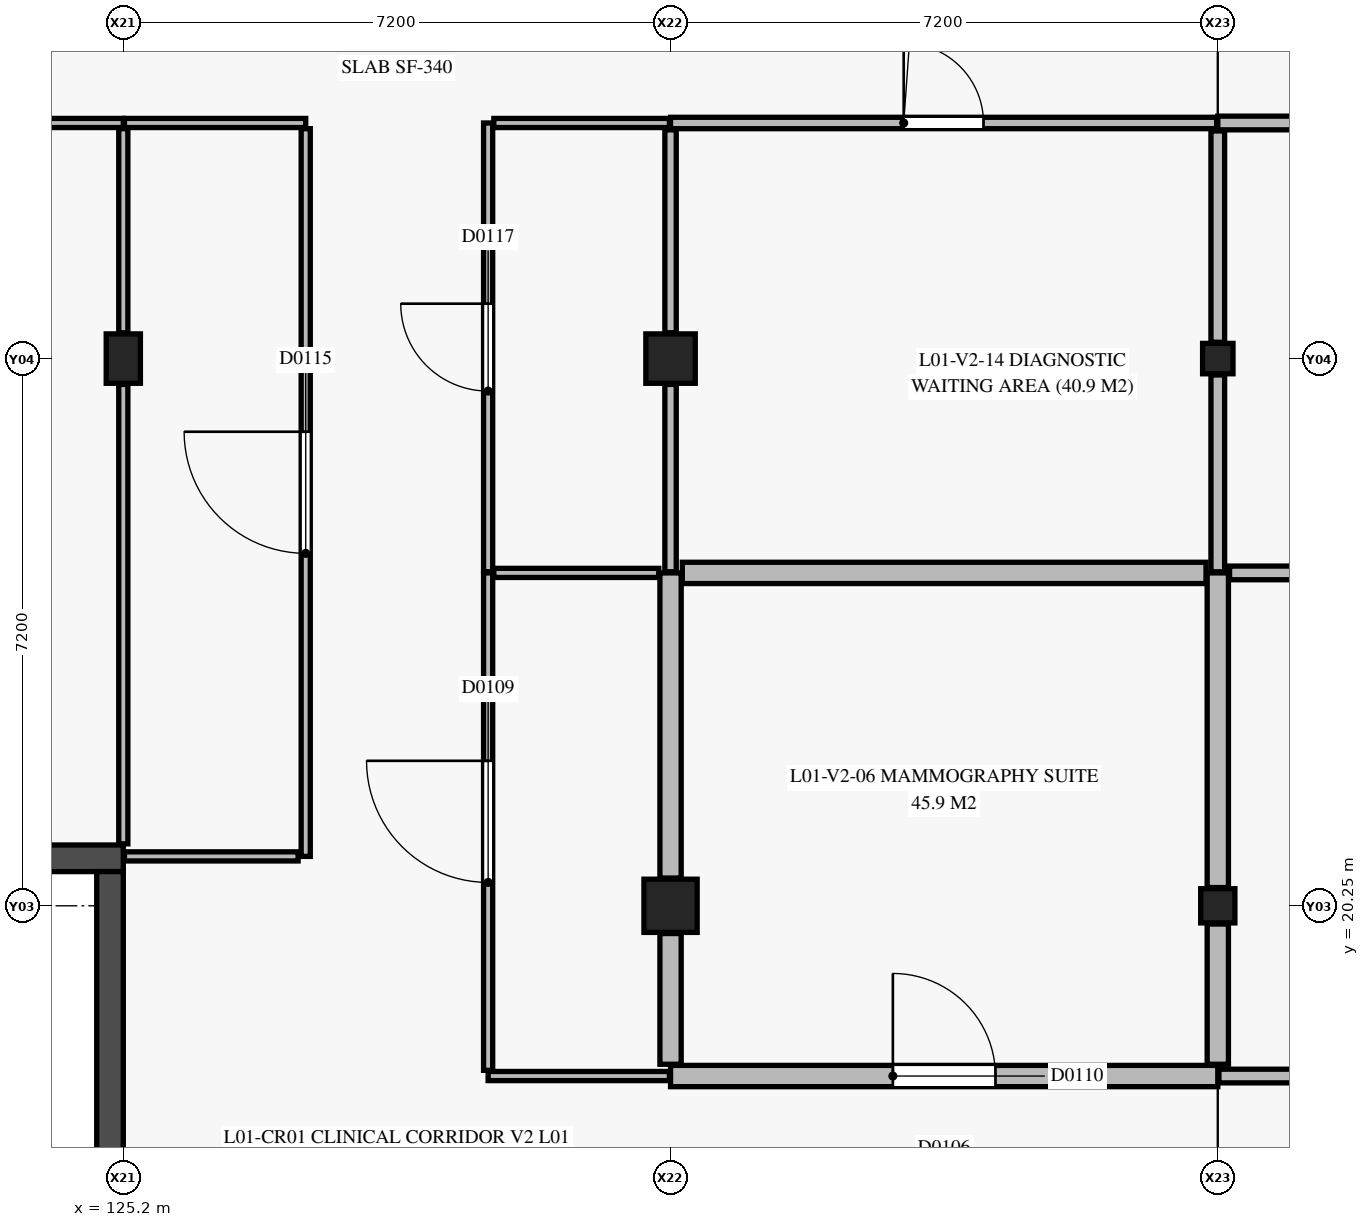
"""IFC4 building model, lengths in metres.
Left out: names, types, materials, properties, quantities, classifications, styles, units other than length and angle.
Written with IfcOpenShell. Run it as: python <this file> out.ifc"""

import sys

from ifc_helpers import new_model, si_unit, direction, frame, frame_2d, origin, origin_2d, place, context, subcontext, project, spatial, rectangle, extrude, element, fill, save


model = new_model("IFC4")
c1 = context("Model", 3, precision=1e-05, world=origin(), true_north=direction((0.0, 1.0)))
c2 = subcontext(c1, "Body", "Model", "MODEL_VIEW")
j1 = project(units=[si_unit("LENGTHUNIT", "METRE"), si_unit("PLANEANGLEUNIT", "RADIAN")], contexts=[c1])
p1 = place(None, origin())
s1 = spatial("IfcSite", under=j1, at=p1, CompositionType="ELEMENT")
p2 = place(p1, origin())
s2 = spatial("IfcBuilding", under=s1, at=p2, CompositionType="ELEMENT")
p3 = place(p2, frame((0.0, 0.0, 4.8)))
s3 = spatial("IfcBuildingStorey", under=s2, at=p3, CompositionType="ELEMENT", Elevation=4.8)
p4 = place(p3, frame((125.2, 27.45, 0.0), z_axis=(0.0, 0.0, 1.0), x_axis=(1.0, 0.0, 0.0)))
e1 = element("IfcColumn", 1, at=p4, inside=s3, PredefinedType="COLUMN", context=c2, shape_type="SweptSolid", body=[
    extrude(rectangle(XDim=0.45, YDim=0.65, at=origin_2d()), origin(), (0.0, 0.0, 1.0), 4.05),
])
p5 = place(p3, frame((132.4, 20.25, 0.0), z_axis=(0.0, 0.0, 1.0), x_axis=(1.0, 0.0, 0.0)))
e2 = element("IfcColumn", 2, at=p5, inside=s3, PredefinedType="COLUMN", context=c2, shape_type="SweptSolid", body=[
    extrude(rectangle(XDim=0.7, YDim=0.7, at=origin_2d()), origin(), (0.0, 0.0, 1.0), 4.05),
])
p6 = place(p3, frame((132.4, 27.45, 0.0), z_axis=(0.0, 0.0, 1.0), x_axis=(1.0, 0.0, 0.0)))
e3 = element("IfcColumn", 3, at=p6, inside=s3, PredefinedType="COLUMN", context=c2, shape_type="SweptSolid", body=[
    extrude(rectangle(XDim=0.65, YDim=0.65, at=origin_2d()), origin(), (0.0, 0.0, 1.0), 4.05),
])
p7 = place(p3, frame((139.6, 20.25, 0.0), z_axis=(0.0, 0.0, 1.0), x_axis=(1.0, 0.0, 0.0)))
e4 = element("IfcColumn", 4, at=p7, inside=s3, PredefinedType="COLUMN", context=c2, shape_type="SweptSolid", body=[
    extrude(rectangle(XDim=0.45, YDim=0.45, at=origin_2d()), origin(), (0.0, 0.0, 1.0), 4.05),
])
p8 = place(p3, frame((139.6, 27.45, 0.0), z_axis=(0.0, 0.0, 1.0), x_axis=(1.0, 0.0, 0.0)))
e5 = element("IfcColumn", 5, at=p8, inside=s3, PredefinedType="COLUMN", context=c2, shape_type="SweptSolid", body=[
    extrude(rectangle(XDim=0.4, YDim=0.4, at=origin_2d()), origin(), (0.0, 0.0, 1.0), 4.05),
])
p9 = place(p3, frame((121.2, 20.875, 0.0), z_axis=(0.0, 0.0, 1.0), x_axis=(1.0, 0.0, 0.0)))
e6 = element("IfcWall", 6, at=p9, inside=s3, PredefinedType="SHEAR", context=c2, shape_type="SweptSolid", body=[
    extrude(rectangle(XDim=4.0, YDim=0.35, at=frame_2d((2.0, 0.0))), origin(), (0.0, 0.0, 1.0), 4.2),
])
p10 = place(p3, frame((125.025, 13.4, 0.0), z_axis=(0.0, 0.0, 1.0), x_axis=(0.0, 1.0, 0.0)))
e7 = element("IfcWall", 7, at=p10, inside=s3, PredefinedType="SHEAR", context=c2, shape_type="SweptSolid", body=[
    extrude(rectangle(XDim=7.3, YDim=0.35, at=frame_2d((3.65, 0.0))), origin(), (0.0, 0.0, 1.0), 4.2),
])
p11 = place(p10, frame((0.12, 0.0, 0.0)))
e8 = element("IfcOpeningElement", 8, at=p11, cuts=e7, PredefinedType="OPENING", context=c2, shape_type="SweptSolid", body=[
    extrude(rectangle(XDim=1.5, YDim=2.15, at=frame_2d((0.75, 1.075))), frame((0.0, 0.185, 0.0), z_axis=(0.0, -1.0, 0.0), x_axis=(1.0, 0.0, 0.0)), (0.0, 0.0, 1.0), 0.37),
])
p12 = place(p3, frame((132.4, 18.01, 0.0), z_axis=(0.0, 0.0, 1.0), x_axis=(1.0, 0.0, 0.0)))
e9 = element("IfcWall", 9, at=p12, inside=s3, PredefinedType="PARTITIONING", context=c2, shape_type="SweptSolid", body=[
    extrude(rectangle(XDim=7.2, YDim=0.28, at=frame_2d((3.6, 0.0))), origin(), (0.0, 0.0, 1.0), 3.95),
])
p13 = place(p12, frame((2.925, 0.0, 0.0)))
e10 = element("IfcOpeningElement", 10, at=p13, cuts=e9, PredefinedType="OPENING", context=c2, shape_type="SweptSolid", body=[
    extrude(rectangle(XDim=1.35, YDim=2.2, at=frame_2d((0.675, 1.1))), frame((0.0, 0.15, 0.0), z_axis=(0.0, -1.0, 0.0), x_axis=(1.0, 0.0, 0.0)), (0.0, 0.0, 1.0), 0.3),
])
p14 = place(p3, frame((139.615, 18.01, 0.0), z_axis=(0.0, 0.0, 1.0), x_axis=(1.0, 0.0, 0.0)))
e11 = element("IfcWall", 11, at=p14, inside=s3, PredefinedType="PLUMBINGWALL", context=c2, shape_type="SweptSolid", body=[
    extrude(rectangle(XDim=3.435, YDim=0.18, at=frame_2d((1.718, 0.0))), origin(), (0.0, 0.0, 1.0), 3.95),
])
p15 = place(p14, frame((1.242, 0.0, 0.0)))
e12 = element("IfcOpeningElement", 12, at=p15, cuts=e11, PredefinedType="OPENING", context=c2, shape_type="SweptSolid", body=[
    extrude(rectangle(XDim=0.95, YDim=2.1, at=frame_2d((0.475, 1.05))), frame((0.0, 0.1, 0.0), z_axis=(0.0, -1.0, 0.0), x_axis=(1.0, 0.0, 0.0)), (0.0, 0.0, 1.0), 0.2),
])
p16 = place(p3, frame((139.6, 30.55, 0.0), z_axis=(0.0, 0.0, 1.0), x_axis=(1.0, 0.0, 0.0)))
e13 = element("IfcWall", 13, at=p16, inside=s3, PredefinedType="PLUMBINGWALL", context=c2, shape_type="SweptSolid", body=[
    extrude(rectangle(XDim=3.45, YDim=0.18, at=frame_2d((1.725, 0.0))), origin(), (0.0, 0.0, 1.0), 3.95),
])
p17 = place(p16, frame((1.25, 0.0, 0.0)))
e14 = element("IfcOpeningElement", 14, at=p17, cuts=e13, PredefinedType="OPENING", context=c2, shape_type="SweptSolid", body=[
    extrude(rectangle(XDim=0.95, YDim=2.1, at=frame_2d((0.475, 1.05))), frame((0.0, 0.1, 0.0), z_axis=(0.0, -1.0, 0.0), x_axis=(1.0, 0.0, 0.0)), (0.0, 0.0, 1.0), 0.2),
])
p18 = place(p3, frame((132.4, 30.55, 0.0), z_axis=(0.0, 0.0, 1.0), x_axis=(1.0, 0.0, 0.0)))
e15 = element("IfcWall", 15, at=p18, inside=s3, PredefinedType="PARTITIONING", context=c2, shape_type="SweptSolid", body=[
    extrude(rectangle(XDim=7.185, YDim=0.15, at=frame_2d((3.593, 0.0))), origin(), (0.0, 0.0, 1.0), 3.95),
])
p19 = place(p18, frame((3.067, 0.0, 0.0)))
e16 = element("IfcOpeningElement", 16, at=p19, cuts=e15, PredefinedType="OPENING", context=c2, shape_type="SweptSolid", body=[
    extrude(rectangle(XDim=1.05, YDim=2.15, at=frame_2d((0.525, 1.075))), frame((0.0, 0.085, 0.0), z_axis=(0.0, -1.0, 0.0), x_axis=(1.0, 0.0, 0.0)), (0.0, 0.0, 1.0), 0.17),
])
p20 = place(p3, frame((121.675, 30.55, 0.0), z_axis=(0.0, 0.0, 1.0), x_axis=(1.0, 0.0, 0.0)))
e17 = element("IfcWall", 17, at=p20, inside=s3, PredefinedType="PARTITIONING", context=c2, shape_type="SweptSolid", body=[
    extrude(rectangle(XDim=3.525, YDim=0.12, at=frame_2d((1.762, 0.0))), origin(), (0.0, 0.0, 1.0), 3.95),
])
p21 = place(p3, frame((130.0, 18.01, 0.0), z_axis=(0.0, 0.0, 1.0), x_axis=(1.0, 0.0, 0.0)))
e18 = element("IfcWall", 18, at=p21, inside=s3, PredefinedType="PARTITIONING", context=c2, shape_type="SweptSolid", body=[
    extrude(rectangle(XDim=2.385, YDim=0.12, at=frame_2d((1.192, 0.0))), origin(), (0.0, 0.0, 1.0), 3.95),
])
p22 = place(p3, frame((130.0, 18.085, 0.0), z_axis=(0.0, 0.0, 1.0), x_axis=(0.0, 1.0, 0.0)))
e19 = element("IfcWall", 19, at=p22, inside=s3, PredefinedType="PARTITIONING", context=c2, shape_type="SweptSolid", body=[
    extrude(rectangle(XDim=6.545, YDim=0.12, at=frame_2d((3.272, 0.0))), origin(), (0.0, 0.0, 1.0), 3.54),
])
p23 = place(p22, frame((2.472, 0.0, 0.0)))
e20 = element("IfcOpeningElement", 20, at=p23, cuts=e19, PredefinedType="OPENING", context=c2, shape_type="SweptSolid", body=[
    extrude(rectangle(XDim=1.6, YDim=2.25, at=frame_2d((0.8, 1.125))), frame((0.0, 0.07, 0.0), z_axis=(0.0, -1.0, 0.0), x_axis=(1.0, 0.0, 0.0)), (0.0, 0.0, 1.0), 0.14),
])
p24 = place(p3, frame((125.215, 20.9, 0.0), z_axis=(0.0, 0.0, 1.0), x_axis=(1.0, 0.0, 0.0)))
e21 = element("IfcWall", 21, at=p24, inside=s3, PredefinedType="PARTITIONING", context=c2, shape_type="SweptSolid", body=[
    extrude(rectangle(XDim=2.285, YDim=0.12, at=frame_2d((1.143, 0.0))), origin(), (0.0, 0.0, 1.0), 3.95),
])
p25 = place(p3, frame((125.215, 30.55, 0.0), z_axis=(0.0, 0.0, 1.0), x_axis=(1.0, 0.0, 0.0)))
e22 = element("IfcWall", 22, at=p25, inside=s3, PredefinedType="PARTITIONING", context=c2, shape_type="SweptSolid", body=[
    extrude(rectangle(XDim=2.385, YDim=0.12, at=frame_2d((1.192, 0.0))), origin(), (0.0, 0.0, 1.0), 3.95),
])
p26 = place(p3, frame((127.6, 20.9, 0.0), z_axis=(0.0, 0.0, 1.0), x_axis=(0.0, 1.0, 0.0)))
e23 = element("IfcWall", 23, at=p26, inside=s3, PredefinedType="PARTITIONING", context=c2, shape_type="SweptSolid", body=[
    extrude(rectangle(XDim=9.575, YDim=0.12, at=frame_2d((4.788, 0.0))), origin(), (0.0, 0.0, 1.0), 3.44),
])
p27 = place(p26, frame((3.988, 0.0, 0.0)))
e24 = element("IfcOpeningElement", 24, at=p27, cuts=e23, PredefinedType="OPENING", context=c2, shape_type="SweptSolid", body=[
    extrude(rectangle(XDim=1.6, YDim=2.25, at=frame_2d((0.8, 1.125))), frame((0.0, 0.07, 0.0), z_axis=(0.0, -1.0, 0.0), x_axis=(1.0, 0.0, 0.0)), (0.0, 0.0, 1.0), 0.14),
])
p28 = place(p3, frame((130.0, 24.645, 0.0), z_axis=(0.0, 0.0, 1.0), x_axis=(0.0, 1.0, 0.0)))
e25 = element("IfcWall", 25, at=p28, inside=s3, PredefinedType="PARTITIONING", context=c2, shape_type="SweptSolid", body=[
    extrude(rectangle(XDim=5.905, YDim=0.12, at=frame_2d((2.953, 0.0))), origin(), (0.0, 0.0, 1.0), 3.44),
])
p29 = place(p28, frame((2.377, 0.0, 0.0)))
e26 = element("IfcOpeningElement", 26, at=p29, cuts=e25, PredefinedType="OPENING", context=c2, shape_type="SweptSolid", body=[
    extrude(rectangle(XDim=1.15, YDim=2.15, at=frame_2d((0.575, 1.075))), frame((0.0, 0.07, 0.0), z_axis=(0.0, -1.0, 0.0), x_axis=(1.0, 0.0, 0.0)), (0.0, 0.0, 1.0), 0.14),
])
p30 = place(p3, frame((130.075, 30.55, 0.0), z_axis=(0.0, 0.0, 1.0), x_axis=(1.0, 0.0, 0.0)))
e27 = element("IfcWall", 27, at=p30, inside=s3, PredefinedType="PARTITIONING", context=c2, shape_type="SweptSolid", body=[
    extrude(rectangle(XDim=2.31, YDim=0.12, at=frame_2d((1.155, 0.0))), origin(), (0.0, 0.0, 1.0), 3.95),
])
p31 = place(p3, frame((132.4, 18.165, 0.0), z_axis=(0.0, 0.0, 1.0), x_axis=(0.0, 1.0, 0.0)))
e28 = element("IfcWall", 28, at=p31, inside=s3, PredefinedType="PARTITIONING", context=c2, shape_type="SweptSolid", body=[
    extrude(rectangle(XDim=1.72, YDim=0.28, at=frame_2d((0.86, 0.0))), origin(), (0.0, 0.0, 1.0), 3.95),
])
p32 = place(p3, frame((132.4, 20.615, 0.0), z_axis=(0.0, 0.0, 1.0), x_axis=(0.0, 1.0, 0.0)))
e29 = element("IfcWall", 29, at=p32, inside=s3, PredefinedType="PARTITIONING", context=c2, shape_type="SweptSolid", body=[
    extrude(rectangle(XDim=4.015, YDim=0.28, at=frame_2d((2.007, 0.0))), origin(), (0.0, 0.0, 1.0), 3.95),
])
p33 = place(p3, frame((139.6, 18.165, 0.0), z_axis=(0.0, 0.0, 1.0), x_axis=(0.0, 1.0, 0.0)))
e30 = element("IfcWall", 30, at=p33, inside=s3, PredefinedType="PARTITIONING", context=c2, shape_type="SweptSolid", body=[
    extrude(rectangle(XDim=1.845, YDim=0.28, at=frame_2d((0.922, 0.0))), origin(), (0.0, 0.0, 1.0), 3.95),
])
p34 = place(p3, frame((139.6, 20.49, 0.0), z_axis=(0.0, 0.0, 1.0), x_axis=(0.0, 1.0, 0.0)))
e31 = element("IfcWall", 31, at=p34, inside=s3, PredefinedType="PARTITIONING", context=c2, shape_type="SweptSolid", body=[
    extrude(rectangle(XDim=4.14, YDim=0.28, at=frame_2d((2.07, 0.0))), origin(), (0.0, 0.0, 1.0), 3.95),
])
p35 = place(p3, frame((132.555, 24.63, 0.0), z_axis=(0.0, 0.0, 1.0), x_axis=(1.0, 0.0, 0.0)))
e32 = element("IfcWall", 32, at=p35, inside=s3, PredefinedType="PARTITIONING", context=c2, shape_type="SweptSolid", body=[
    extrude(rectangle(XDim=6.89, YDim=0.28, at=frame_2d((3.445, 0.0))), origin(), (0.0, 0.0, 1.0), 3.95),
])
p36 = place(p3, frame((139.755, 24.63, 0.0), z_axis=(0.0, 0.0, 1.0), x_axis=(1.0, 0.0, 0.0)))
e33 = element("IfcWall", 33, at=p36, inside=s3, PredefinedType="PLUMBINGWALL", context=c2, shape_type="SweptSolid", body=[
    extrude(rectangle(XDim=3.19, YDim=0.18, at=frame_2d((1.595, 0.0))), origin(), (0.0, 0.0, 1.0), 3.95),
])
p37 = place(p3, frame((139.6, 24.645, 0.0), z_axis=(0.0, 0.0, 1.0), x_axis=(0.0, 1.0, 0.0)))
e34 = element("IfcWall", 34, at=p37, inside=s3, PredefinedType="PLUMBINGWALL", context=c2, shape_type="SweptSolid", body=[
    extrude(rectangle(XDim=2.59, YDim=0.18, at=frame_2d((1.295, 0.0))), origin(), (0.0, 0.0, 1.0), 3.95),
])
p38 = place(p3, frame((139.6, 27.665, 0.0), z_axis=(0.0, 0.0, 1.0), x_axis=(0.0, 1.0, 0.0)))
e35 = element("IfcWall", 35, at=p38, inside=s3, PredefinedType="PLUMBINGWALL", context=c2, shape_type="SweptSolid", body=[
    extrude(rectangle(XDim=2.78, YDim=0.18, at=frame_2d((1.39, 0.0))), origin(), (0.0, 0.0, 1.0), 3.95),
])
p39 = place(p3, frame((132.4, 24.645, 0.0), z_axis=(0.0, 0.0, 1.0), x_axis=(0.0, 1.0, 0.0)))
e36 = element("IfcWall", 36, at=p39, inside=s3, PredefinedType="PARTITIONING", context=c2, shape_type="SweptSolid", body=[
    extrude(rectangle(XDim=2.465, YDim=0.15, at=frame_2d((1.232, 0.0))), origin(), (0.0, 0.0, 1.0), 3.95),
])
p40 = place(p3, frame((132.4, 27.79, 0.0), z_axis=(0.0, 0.0, 1.0), x_axis=(0.0, 1.0, 0.0)))
e37 = element("IfcWall", 37, at=p40, inside=s3, PredefinedType="PARTITIONING", context=c2, shape_type="SweptSolid", body=[
    extrude(rectangle(XDim=2.67, YDim=0.15, at=frame_2d((1.335, 0.0))), origin(), (0.0, 0.0, 1.0), 3.95),
])
p41 = place(p3, frame((125.2, 21.065, 0.0), z_axis=(0.0, 0.0, 1.0), x_axis=(0.0, 1.0, 0.0)))
e38 = element("IfcWall", 38, at=p41, inside=s3, PredefinedType="PARTITIONING", context=c2, shape_type="SweptSolid", body=[
    extrude(rectangle(XDim=6.045, YDim=0.12, at=frame_2d((3.022, 0.0))), origin(), (0.0, 0.0, 1.0), 3.95),
])
p42 = place(p3, frame((125.2, 27.79, 0.0), z_axis=(0.0, 0.0, 1.0), x_axis=(0.0, 1.0, 0.0)))
e39 = element("IfcWall", 39, at=p42, inside=s3, PredefinedType="PARTITIONING", context=c2, shape_type="SweptSolid", body=[
    extrude(rectangle(XDim=2.685, YDim=0.12, at=frame_2d((1.343, 0.0))), origin(), (0.0, 0.0, 1.0), 3.95),
])
p43 = place(p3, frame((130.075, 24.63, 0.0), z_axis=(0.0, 0.0, 1.0), x_axis=(1.0, 0.0, 0.0)))
e40 = element("IfcWall", 40, at=p43, inside=s3, PredefinedType="PARTITIONING", context=c2, shape_type="SweptSolid", body=[
    extrude(rectangle(XDim=2.17, YDim=0.12, at=frame_2d((1.085, 0.0))), origin(), (0.0, 0.0, 1.0), 3.95),
])
p44 = place(p23, origin())
e41 = element("IfcDoor", 41, at=p44, inside=s3, OperationType="SINGLE_SWING_RIGHT", PredefinedType="DOOR", context=c2, shape_type="SweptSolid", body=[
    extrude(rectangle(XDim=1.6, YDim=2.25, at=frame_2d((0.8, 1.125))), frame((0.0, 0.025, 0.0), z_axis=(0.0, -1.0, 0.0), x_axis=(1.0, 0.0, 0.0)), (0.0, 0.0, 1.0), 0.05),
])
fill(e20, e41)
p45 = place(p13, origin())
e42 = element("IfcDoor", 42, at=p45, inside=s3, OperationType="SINGLE_SWING_LEFT", PredefinedType="DOOR", context=c2, shape_type="SweptSolid", body=[
    extrude(rectangle(XDim=1.35, YDim=2.2, at=frame_2d((0.675, 1.1))), frame((0.0, 0.025, 0.0), z_axis=(0.0, -1.0, 0.0), x_axis=(1.0, 0.0, 0.0)), (0.0, 0.0, 1.0), 0.05),
])
fill(e10, e42)
p46 = place(p27, origin())
e43 = element("IfcDoor", 43, at=p46, inside=s3, OperationType="SINGLE_SWING_RIGHT", PredefinedType="DOOR", context=c2, shape_type="SweptSolid", body=[
    extrude(rectangle(XDim=1.6, YDim=2.25, at=frame_2d((0.8, 1.125))), frame((0.0, 0.025, 0.0), z_axis=(0.0, -1.0, 0.0), x_axis=(1.0, 0.0, 0.0)), (0.0, 0.0, 1.0), 0.05),
])
fill(e24, e43)
p47 = place(p29, origin())
e44 = element("IfcDoor", 44, at=p47, inside=s3, OperationType="SINGLE_SWING_RIGHT", PredefinedType="DOOR", context=c2, shape_type="SweptSolid", body=[
    extrude(rectangle(XDim=1.15, YDim=2.15, at=frame_2d((0.575, 1.075))), frame((0.0, 0.025, 0.0), z_axis=(0.0, -1.0, 0.0), x_axis=(1.0, 0.0, 0.0)), (0.0, 0.0, 1.0), 0.05),
])
fill(e26, e44)
p48 = place(p19, origin())
e45 = element("IfcDoor", 45, at=p48, inside=s3, OperationType="SINGLE_SWING_LEFT", PredefinedType="DOOR", context=c2, shape_type="SweptSolid", body=[
    extrude(rectangle(XDim=1.05, YDim=2.15, at=frame_2d((0.525, 1.075))), frame((0.0, 0.025, 0.0), z_axis=(0.0, -1.0, 0.0), x_axis=(1.0, 0.0, 0.0)), (0.0, 0.0, 1.0), 0.05),
])
fill(e16, e45)
save(model, sys.argv[1])
